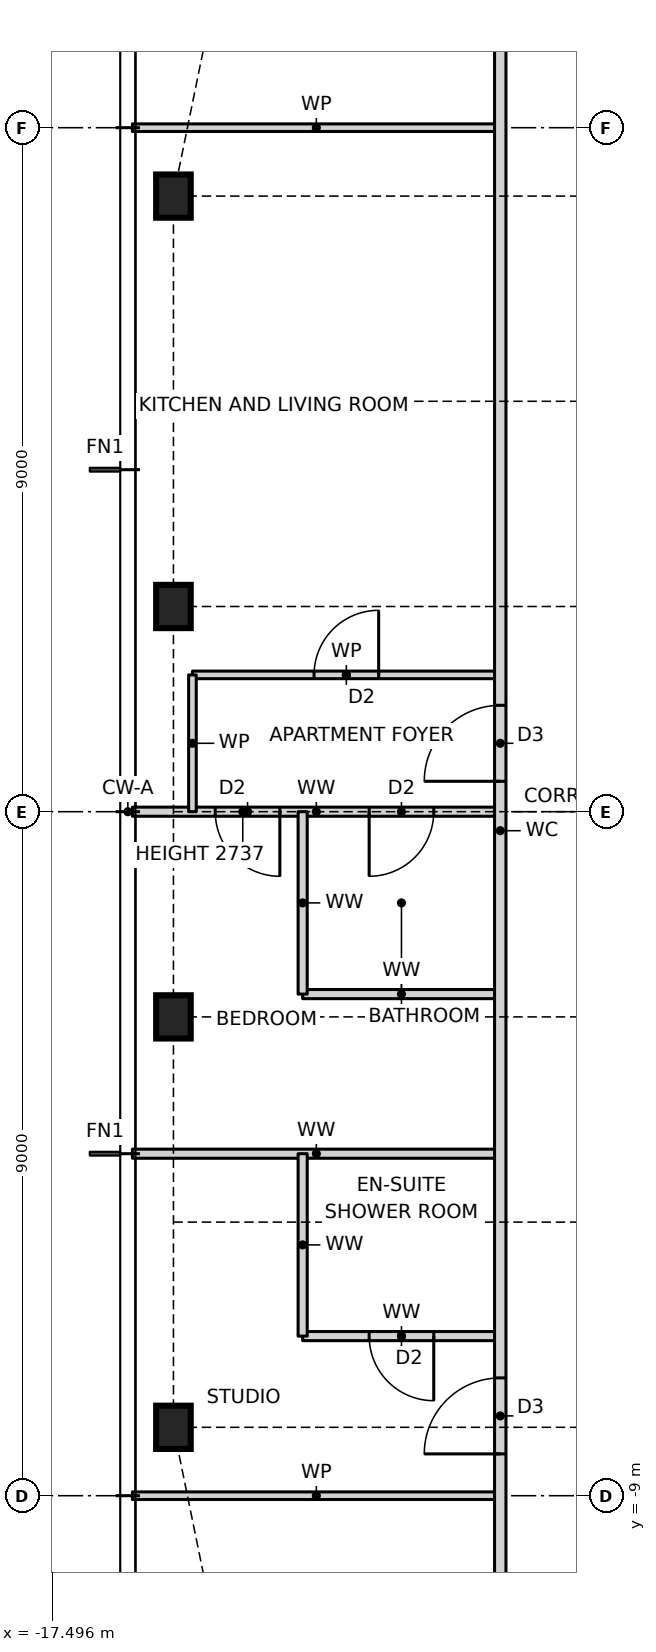
"""IFC4 building model, lengths in metres.
Left out: names, types, materials, properties, quantities, classifications, styles, units other than length and angle.
Written with IfcOpenShell. Run it as: python <this file> out.ifc"""

import sys

from ifc_helpers import new_model, si_unit, direction, frame, frame_2d, origin, origin_2d, place, context, subcontext, project, spatial, rectangle, i_section, extrude, element, fill, save


model = new_model("IFC4")
c1 = context("Model", 3, precision=1e-05, world=origin(), true_north=direction((0.0, 1.0)))
c2 = subcontext(c1, "Body", "Model", "MODEL_VIEW")
j1 = project(units=[si_unit("LENGTHUNIT", "METRE"), si_unit("PLANEANGLEUNIT", "RADIAN")], contexts=[c1])
p1 = place(None, origin())
s1 = spatial("IfcSite", under=j1, at=p1, CompositionType="ELEMENT")
p2 = place(p1, origin())
s2 = spatial("IfcBuilding", under=s1, at=p2, CompositionType="ELEMENT")
p3 = place(p2, frame((0.0, 0.0, 232.5)))
s3 = spatial("IfcBuildingStorey", under=s2, at=p3, CompositionType="ELEMENT", Elevation=232.5)
for number, where, z_axis, x_axis in (
    (1, (-15.9, 8.1, 0.0), (0.0, 0.0, 1.0), (1.0, 0.0, 0.0)),
    (2, (-15.9, 2.7, 0.0), (0.0, 0.0, 1.0), (1.0, 0.0, 0.0)),
    (3, (-15.9, -2.7, 0.0), (0.0, 0.0, 1.0), (1.0, 0.0, 0.0)),
    (4, (-15.9, -8.1, 0.0), (0.0, 0.0, 1.0), (1.0, 0.0, 0.0)),
):
    element("IfcColumn", number, at=place(p3, frame(where, z_axis=z_axis, x_axis=x_axis)), inside=s3, PredefinedType="COLUMN", context=c2, shape_type="SweptSolid", body=[
        extrude(i_section(OverallWidth=0.455, OverallDepth=0.569, WebThickness=0.078, FlangeThickness=0.125, at=origin_2d()), origin(), (0.0, 0.0, 1.0), 3.5),
    ])
p4 = place(p3, frame((-16.44, -9.0, 0.0), z_axis=(0.0, 0.0, 1.0), x_axis=(1.0, 0.0, 0.0)))
e5 = element("IfcWall", 5, at=p4, inside=s3, PredefinedType="PARTITIONING", context=c2, shape_type="SweptSolid", body=[
    extrude(rectangle(XDim=4.84, YDim=0.1, at=frame_2d((2.42, 0.0))), origin(), (0.0, 0.0, 1.0), 3.27),
])
p5 = place(p3, frame((-14.2, -6.9, 0.0), z_axis=(0.0, 0.0, 1.0), x_axis=(1.0, 0.0, 0.0)))
e6 = element("IfcWall", 6, at=p5, inside=s3, PredefinedType="PARTITIONING", context=c2, shape_type="SweptSolid", body=[
    extrude(rectangle(XDim=2.6, YDim=0.12, at=frame_2d((1.3, 0.0))), origin(), (0.0, 0.0, 1.0), 3.27),
])
p6 = place(p5, frame((0.875, 0.0, 0.0)))
e7 = element("IfcOpeningElement", 7, at=p6, cuts=e6, PredefinedType="OPENING", context=c2, shape_type="SweptSolid", body=[
    extrude(rectangle(XDim=0.85, YDim=2.1, at=frame_2d((0.425, 1.05))), frame((0.0, 0.07, 0.0), z_axis=(0.0, -1.0, 0.0), x_axis=(1.0, 0.0, 0.0)), (0.0, 0.0, 1.0), 0.14),
])
p7 = place(p3, frame((-16.44, -4.5, 0.0), z_axis=(0.0, 0.0, 1.0), x_axis=(1.0, 0.0, 0.0)))
e8 = element("IfcWall", 8, at=p7, inside=s3, PredefinedType="PARTITIONING", context=c2, shape_type="SweptSolid", body=[
    extrude(rectangle(XDim=4.84, YDim=0.12, at=frame_2d((2.42, 0.0))), origin(), (0.0, 0.0, 1.0), 3.27),
])
p8 = place(p3, frame((-14.2, -2.4, 0.0), z_axis=(0.0, 0.0, 1.0), x_axis=(1.0, 0.0, 0.0)))
e9 = element("IfcWall", 9, at=p8, inside=s3, PredefinedType="PARTITIONING", context=c2, shape_type="SweptSolid", body=[
    extrude(rectangle(XDim=2.6, YDim=0.12, at=frame_2d((1.3, 0.0))), origin(), (0.0, 0.0, 1.0), 3.27),
])
p9 = place(p3, frame((-16.44, 0.0, 0.0), z_axis=(0.0, 0.0, 1.0), x_axis=(1.0, 0.0, 0.0)))
e10 = element("IfcWall", 10, at=p9, inside=s3, PredefinedType="PARTITIONING", context=c2, shape_type="SweptSolid", body=[
    extrude(rectangle(XDim=4.84, YDim=0.12, at=frame_2d((2.42, 0.0))), origin(), (0.0, 0.0, 1.0), 2.737),
])
p10 = place(p9, frame((1.09, 0.0, 0.0)))
e11 = element("IfcOpeningElement", 11, at=p10, cuts=e10, PredefinedType="OPENING", context=c2, shape_type="SweptSolid", body=[
    extrude(rectangle(XDim=0.85, YDim=2.1, at=frame_2d((0.425, 1.05))), frame((0.0, 0.07, 0.0), z_axis=(0.0, -1.0, 0.0), x_axis=(1.0, 0.0, 0.0)), (0.0, 0.0, 1.0), 0.14),
])
p11 = place(p9, frame((3.115, 0.0, 0.0)))
e12 = element("IfcOpeningElement", 12, at=p11, cuts=e10, PredefinedType="OPENING", context=c2, shape_type="SweptSolid", body=[
    extrude(rectangle(XDim=0.85, YDim=2.1, at=frame_2d((0.425, 1.05))), frame((0.0, 0.07, 0.0), z_axis=(0.0, -1.0, 0.0), x_axis=(1.0, 0.0, 0.0)), (0.0, 0.0, 1.0), 0.14),
])
p12 = place(p3, frame((-15.65, 1.8, 0.0), z_axis=(0.0, 0.0, 1.0), x_axis=(1.0, 0.0, 0.0)))
e13 = element("IfcWall", 13, at=p12, inside=s3, PredefinedType="PARTITIONING", context=c2, shape_type="SweptSolid", body=[
    extrude(rectangle(XDim=4.05, YDim=0.1, at=frame_2d((2.025, 0.0))), origin(), (0.0, 0.0, 1.0), 3.27),
])
p13 = place(p12, frame((1.6, 0.0, 0.0)))
e14 = element("IfcOpeningElement", 14, at=p13, cuts=e13, PredefinedType="OPENING", context=c2, shape_type="SweptSolid", body=[
    extrude(rectangle(XDim=0.85, YDim=2.1, at=frame_2d((0.425, 1.05))), frame((0.0, 0.06, 0.0), z_axis=(0.0, -1.0, 0.0), x_axis=(1.0, 0.0, 0.0)), (0.0, 0.0, 1.0), 0.12),
])
p14 = place(p3, frame((-16.44, 9.0, 0.0), z_axis=(0.0, 0.0, 1.0), x_axis=(1.0, 0.0, 0.0)))
e15 = element("IfcWall", 15, at=p14, inside=s3, PredefinedType="PARTITIONING", context=c2, shape_type="SweptSolid", body=[
    extrude(rectangle(XDim=4.84, YDim=0.1, at=frame_2d((2.42, 0.0))), origin(), (0.0, 0.0, 1.0), 3.27),
])
p15 = place(p3, frame((-11.6, -12.1, 0.0), z_axis=(0.0, 0.0, 1.0), x_axis=(0.0, 1.0, 0.0)))
e16 = element("IfcWall", 16, at=p15, inside=s3, PredefinedType="PARTITIONING", context=c2, shape_type="SweptSolid", body=[
    extrude(rectangle(XDim=23.7, YDim=0.15, at=frame_2d((11.85, 0.0))), origin(), (0.0, 0.0, 1.0), 3.27),
])
p16 = place(p15, frame((12.5, 0.0, 0.0)))
e17 = element("IfcOpeningElement", 17, at=p16, cuts=e16, PredefinedType="OPENING", context=c2, shape_type="SweptSolid", body=[
    extrude(rectangle(XDim=1.0, YDim=2.1, at=frame_2d((0.5, 1.05))), frame((0.0, 0.085, 0.0), z_axis=(0.0, -1.0, 0.0), x_axis=(1.0, 0.0, 0.0)), (0.0, 0.0, 1.0), 0.17),
])
p17 = place(p15, frame((3.65, 0.0, 0.0)))
e18 = element("IfcOpeningElement", 18, at=p17, cuts=e16, PredefinedType="OPENING", context=c2, shape_type="SweptSolid", body=[
    extrude(rectangle(XDim=1.0, YDim=2.1, at=frame_2d((0.5, 1.05))), frame((0.0, 0.085, 0.0), z_axis=(0.0, -1.0, 0.0), x_axis=(1.0, 0.0, 0.0)), (0.0, 0.0, 1.0), 0.17),
])
p18 = place(p15, frame((1.125, 0.0, 0.0)))
e19 = element("IfcOpeningElement", 19, at=p18, cuts=e16, PredefinedType="OPENING", context=c2, shape_type="SweptSolid", body=[
    extrude(rectangle(XDim=0.85, YDim=2.1, at=frame_2d((0.425, 1.05))), frame((0.0, 0.085, 0.0), z_axis=(0.0, -1.0, 0.0), x_axis=(1.0, 0.0, 0.0)), (0.0, 0.0, 1.0), 0.17),
])
for number, where, z_axis, x_axis in (
    (20, (-14.2, -6.9, 0.0), (0.0, 0.0, 1.0), (0.0, 1.0, 0.0)),
    (21, (-14.2, -2.4, 0.0), (0.0, 0.0, 1.0), (0.0, 1.0, 0.0)),
):
    element("IfcWall", number, at=place(p3, frame(where, z_axis=z_axis, x_axis=x_axis)), inside=s3, PredefinedType="PARTITIONING", context=c2, shape_type="SweptSolid", body=[
        extrude(rectangle(XDim=2.4, YDim=0.12, at=frame_2d((1.2, 0.0))), origin(), (0.0, 0.0, 1.0), 3.27),
    ])
p19 = place(p3, frame((-15.65, 0.0, 0.0), z_axis=(0.0, 0.0, 1.0), x_axis=(0.0, 1.0, 0.0)))
e22 = element("IfcWall", 22, at=p19, inside=s3, PredefinedType="PARTITIONING", context=c2, shape_type="SweptSolid", body=[
    extrude(rectangle(XDim=1.8, YDim=0.1, at=frame_2d((0.9, 0.0))), origin(), (0.0, 0.0, 1.0), 3.27),
])
p20 = place(p16, origin())
e23 = element("IfcDoor", 23, at=p20, inside=s3, OperationType="SINGLE_SWING_LEFT", PredefinedType="DOOR", context=c2, shape_type="SweptSolid", body=[
    extrude(rectangle(XDim=1.0, YDim=2.1, at=frame_2d((0.5, 1.05))), frame((0.0, 0.025, 0.0), z_axis=(0.0, -1.0, 0.0), x_axis=(1.0, 0.0, 0.0)), (0.0, 0.0, 1.0), 0.05),
])
fill(e17, e23)
p21 = place(p13, origin())
e24 = element("IfcDoor", 24, at=p21, inside=s3, OperationType="SINGLE_SWING_RIGHT", PredefinedType="DOOR", context=c2, shape_type="SweptSolid", body=[
    extrude(rectangle(XDim=0.85, YDim=2.1, at=frame_2d((0.425, 1.05))), frame((0.0, 0.025, 0.0), z_axis=(0.0, -1.0, 0.0), x_axis=(1.0, 0.0, 0.0)), (0.0, 0.0, 1.0), 0.05),
])
fill(e14, e24)
p22 = place(p10, frame((0.85, 0.0, 0.0), z_axis=(0.0, 0.0, 1.0), x_axis=(-1.0, 0.0, 0.0)))
e25 = element("IfcDoor", 25, at=p22, inside=s3, OperationType="SINGLE_SWING_LEFT", PredefinedType="DOOR", context=c2, shape_type="SweptSolid", body=[
    extrude(rectangle(XDim=0.85, YDim=2.1, at=frame_2d((0.425, 1.05))), frame((0.0, 0.025, 0.0), z_axis=(0.0, -1.0, 0.0), x_axis=(1.0, 0.0, 0.0)), (0.0, 0.0, 1.0), 0.05),
])
fill(e11, e25)
p23 = place(p11, frame((0.85, 0.0, 0.0), z_axis=(0.0, 0.0, 1.0), x_axis=(-1.0, 0.0, 0.0)))
e26 = element("IfcDoor", 26, at=p23, inside=s3, OperationType="SINGLE_SWING_RIGHT", PredefinedType="DOOR", context=c2, shape_type="SweptSolid", body=[
    extrude(rectangle(XDim=0.85, YDim=2.1, at=frame_2d((0.425, 1.05))), frame((0.0, 0.025, 0.0), z_axis=(0.0, -1.0, 0.0), x_axis=(1.0, 0.0, 0.0)), (0.0, 0.0, 1.0), 0.05),
])
fill(e12, e26)
p24 = place(p17, origin())
e27 = element("IfcDoor", 27, at=p24, inside=s3, OperationType="SINGLE_SWING_LEFT", PredefinedType="DOOR", context=c2, shape_type="SweptSolid", body=[
    extrude(rectangle(XDim=1.0, YDim=2.1, at=frame_2d((0.5, 1.05))), frame((0.0, 0.025, 0.0), z_axis=(0.0, -1.0, 0.0), x_axis=(1.0, 0.0, 0.0)), (0.0, 0.0, 1.0), 0.05),
])
fill(e18, e27)
p25 = place(p6, frame((0.85, 0.0, 0.0), z_axis=(0.0, 0.0, 1.0), x_axis=(-1.0, 0.0, 0.0)))
e28 = element("IfcDoor", 28, at=p25, inside=s3, OperationType="SINGLE_SWING_LEFT", PredefinedType="DOOR", context=c2, shape_type="SweptSolid", body=[
    extrude(rectangle(XDim=0.85, YDim=2.1, at=frame_2d((0.425, 1.05))), frame((0.0, 0.025, 0.0), z_axis=(0.0, -1.0, 0.0), x_axis=(1.0, 0.0, 0.0)), (0.0, 0.0, 1.0), 0.05),
])
fill(e7, e28)
save(model, sys.argv[1])
